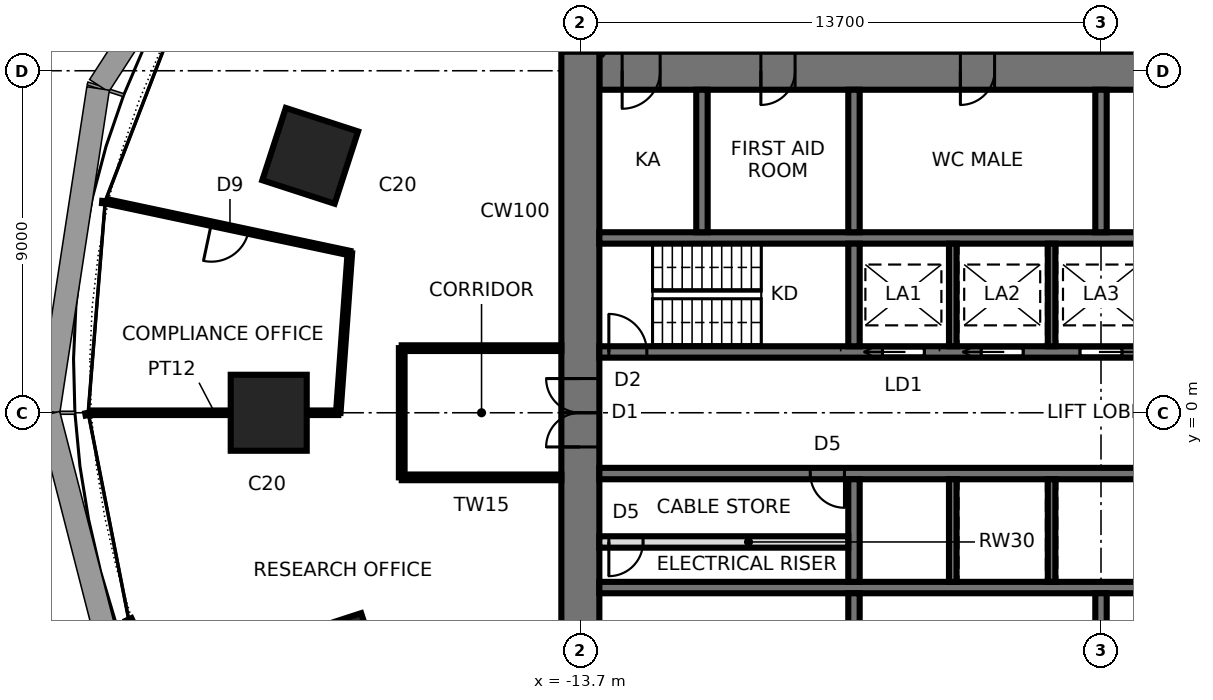
"""IFC4 building model, lengths in metres.
Left out: names, types, materials, properties, quantities, classifications, styles, units other than length and angle.
Written with IfcOpenShell. Run it as: python <this file> out.ifc"""

import sys

from ifc_helpers import new_model, si_unit, direction, frame, frame_2d, origin, origin_2d, place, context, subcontext, project, spatial, rectangle, extrude, element, fill, save


model = new_model("IFC4")
c1 = context("Model", 3, precision=1e-05, world=origin(), true_north=direction((0.0, 1.0)))
c2 = subcontext(c1, "Body", "Model", "MODEL_VIEW")
j1 = project(units=[si_unit("LENGTHUNIT", "METRE"), si_unit("PLANEANGLEUNIT", "RADIAN")], contexts=[c1])
p1 = place(None, origin())
s1 = spatial("IfcSite", under=j1, at=p1, CompositionType="ELEMENT")
p2 = place(p1, origin())
s2 = spatial("IfcBuilding", under=s1, at=p2, CompositionType="ELEMENT")
p3 = place(p2, frame((0.0, 0.0, 57.4)))
s3 = spatial("IfcBuildingStorey", under=s2, at=p3, CompositionType="ELEMENT", Elevation=57.4)
for number, where, z_axis, x_axis in (
    (1, (-20.808, 6.761, 0.0), (0.0, 0.0, 1.0), (-0.951, 0.309, 0.0)),
    (2, (-21.9, 0.0, 0.0), (0.0, 0.0, 1.0), (-1.0, 0.0, 0.0)),
    (3, (-20.109, -6.534, 0.0), (0.0, 0.0, 1.0), (-0.951, -0.309, 0.0)),
):
    element("IfcColumn", number, at=place(p3, frame(where, z_axis=z_axis, x_axis=x_axis)), inside=s3, PredefinedType="COLUMN", context=c2, shape_type="SweptSolid", body=[
        extrude(rectangle(XDim=2.0, YDim=2.0, at=origin_2d()), origin(), (0.0, 0.0, 1.0), 4.2),
    ])
p4 = place(p3, frame((13.2, 9.0, 0.0), z_axis=(0.0, 0.0, 1.0), x_axis=(-1.0, 0.0, 0.0)))
e4 = element("IfcWall", 4, at=p4, inside=s3, PredefinedType="SHEAR", context=c2, shape_type="SweptSolid", body=[
    extrude(rectangle(XDim=26.4, YDim=1.0, at=frame_2d((13.2, 0.0))), origin(), (0.0, 0.0, 1.0), 4.2),
])
p5 = place(p4, frame((2.65, 0.0, 0.0)))
e5 = element("IfcOpeningElement", 5, at=p5, cuts=e4, PredefinedType="OPENING", context=c2, shape_type="SweptSolid", body=[
    extrude(rectangle(XDim=0.9, YDim=2.1, at=frame_2d((0.45, 1.05))), frame((0.0, 0.51, 0.0), z_axis=(0.0, -1.0, 0.0), x_axis=(1.0, 0.0, 0.0)), (0.0, 0.0, 1.0), 1.02),
])
p6 = place(p4, frame((9.5, 0.0, 0.0)))
e6 = element("IfcOpeningElement", 6, at=p6, cuts=e4, PredefinedType="OPENING", context=c2, shape_type="SweptSolid", body=[
    extrude(rectangle(XDim=0.9, YDim=2.1, at=frame_2d((0.45, 1.05))), frame((0.0, 0.51, 0.0), z_axis=(0.0, -1.0, 0.0), x_axis=(1.0, 0.0, 0.0)), (0.0, 0.0, 1.0), 1.02),
])
p7 = place(p4, frame((16.0, 0.0, 0.0)))
e7 = element("IfcOpeningElement", 7, at=p7, cuts=e4, PredefinedType="OPENING", context=c2, shape_type="SweptSolid", body=[
    extrude(rectangle(XDim=0.9, YDim=2.1, at=frame_2d((0.45, 1.05))), frame((0.0, 0.51, 0.0), z_axis=(0.0, -1.0, 0.0), x_axis=(1.0, 0.0, 0.0)), (0.0, 0.0, 1.0), 1.02),
])
p8 = place(p4, frame((21.25, 0.0, 0.0)))
e8 = element("IfcOpeningElement", 8, at=p8, cuts=e4, PredefinedType="OPENING", context=c2, shape_type="SweptSolid", body=[
    extrude(rectangle(XDim=0.9, YDim=2.1, at=frame_2d((0.45, 1.05))), frame((0.0, 0.51, 0.0), z_axis=(0.0, -1.0, 0.0), x_axis=(1.0, 0.0, 0.0)), (0.0, 0.0, 1.0), 1.02),
])
p9 = place(p4, frame((24.8, 0.0, 0.0)))
e9 = element("IfcOpeningElement", 9, at=p9, cuts=e4, PredefinedType="OPENING", context=c2, shape_type="SweptSolid", body=[
    extrude(rectangle(XDim=1.0, YDim=2.1, at=frame_2d((0.5, 1.05))), frame((0.0, 0.51, 0.0), z_axis=(0.0, -1.0, 0.0), x_axis=(1.0, 0.0, 0.0)), (0.0, 0.0, 1.0), 1.02),
])
p10 = place(p3, frame((-13.7, 9.5, 0.0), z_axis=(0.0, 0.0, 1.0), x_axis=(0.0, -1.0, 0.0)))
e10 = element("IfcWall", 10, at=p10, inside=s3, PredefinedType="SHEAR", context=c2, shape_type="SweptSolid", body=[
    extrude(rectangle(XDim=19.0, YDim=1.0, at=frame_2d((9.5, 0.0))), origin(), (0.0, 0.0, 1.0), 4.2),
])
p11 = place(p10, frame((8.6, 0.0, 0.0)))
e11 = element("IfcOpeningElement", 11, at=p11, cuts=e10, PredefinedType="OPENING", context=c2, shape_type="SweptSolid", body=[
    extrude(rectangle(XDim=1.8, YDim=2.4, at=frame_2d((0.9, 1.2))), frame((0.0, 0.51, 0.0), z_axis=(0.0, -1.0, 0.0), x_axis=(1.0, 0.0, 0.0)), (0.0, 0.0, 1.0), 1.02),
])
p12 = place(p3, frame((-13.2, 1.6, 0.0), z_axis=(0.0, 0.0, 1.0), x_axis=(1.0, 0.0, 0.0)))
e12 = element("IfcWall", 12, at=p12, inside=s3, PredefinedType="SHEAR", context=c2, shape_type="SweptSolid", body=[
    extrude(rectangle(XDim=26.4, YDim=0.3, at=frame_2d((13.2, 0.0))), origin(), (0.0, 0.0, 1.0), 4.2),
])
p13 = place(p12, frame((0.25, 0.0, 0.0)))
e13 = element("IfcOpeningElement", 13, at=p13, cuts=e12, PredefinedType="OPENING", context=c2, shape_type="SweptSolid", body=[
    extrude(rectangle(XDim=1.0, YDim=2.1, at=frame_2d((0.5, 1.05))), frame((0.0, 0.16, 0.0), z_axis=(0.0, -1.0, 0.0), x_axis=(1.0, 0.0, 0.0)), (0.0, 0.0, 1.0), 0.32),
])
p14 = place(p12, frame((20.25, 0.0, 0.0)))
e14 = element("IfcOpeningElement", 14, at=p14, cuts=e12, PredefinedType="OPENING", context=c2, shape_type="SweptSolid", body=[
    extrude(rectangle(XDim=1.5, YDim=2.4, at=frame_2d((0.75, 1.2))), frame((0.0, 0.16, 0.0), z_axis=(0.0, -1.0, 0.0), x_axis=(1.0, 0.0, 0.0)), (0.0, 0.0, 1.0), 0.32),
])
p15 = place(p12, frame((7.45, 0.0, 0.0)))
e15 = element("IfcOpeningElement", 15, at=p15, cuts=e12, PredefinedType="OPENING", context=c2, shape_type="SweptSolid", body=[
    extrude(rectangle(XDim=1.1, YDim=2.3, at=frame_2d((0.55, 1.15))), frame((0.0, 0.16, 0.0), z_axis=(0.0, -1.0, 0.0), x_axis=(1.0, 0.0, 0.0)), (0.0, 0.0, 1.0), 0.32),
])
p16 = place(p12, frame((10.05, 0.0, 0.0)))
e16 = element("IfcOpeningElement", 16, at=p16, cuts=e12, PredefinedType="OPENING", context=c2, shape_type="SweptSolid", body=[
    extrude(rectangle(XDim=1.1, YDim=2.3, at=frame_2d((0.55, 1.15))), frame((0.0, 0.16, 0.0), z_axis=(0.0, -1.0, 0.0), x_axis=(1.0, 0.0, 0.0)), (0.0, 0.0, 1.0), 0.32),
])
p17 = place(p12, frame((12.65, 0.0, 0.0)))
e17 = element("IfcOpeningElement", 17, at=p17, cuts=e12, PredefinedType="OPENING", context=c2, shape_type="SweptSolid", body=[
    extrude(rectangle(XDim=1.1, YDim=2.3, at=frame_2d((0.55, 1.15))), frame((0.0, 0.16, 0.0), z_axis=(0.0, -1.0, 0.0), x_axis=(1.0, 0.0, 0.0)), (0.0, 0.0, 1.0), 0.32),
])
p18 = place(p12, frame((24.15, 0.0, 0.0)))
e18 = element("IfcOpeningElement", 18, at=p18, cuts=e12, PredefinedType="OPENING", context=c2, shape_type="SweptSolid", body=[
    extrude(rectangle(XDim=0.9, YDim=2.1, at=frame_2d((0.45, 1.05))), frame((0.0, 0.16, 0.0), z_axis=(0.0, -1.0, 0.0), x_axis=(1.0, 0.0, 0.0)), (0.0, 0.0, 1.0), 0.32),
])
p19 = place(p3, frame((-13.2, -1.6, 0.0), z_axis=(0.0, 0.0, 1.0), x_axis=(1.0, 0.0, 0.0)))
e19 = element("IfcWall", 19, at=p19, inside=s3, PredefinedType="SHEAR", context=c2, shape_type="SweptSolid", body=[
    extrude(rectangle(XDim=26.4, YDim=0.3, at=frame_2d((13.2, 0.0))), origin(), (0.0, 0.0, 1.0), 4.2),
])
p20 = place(p19, frame((25.15, 0.0, 0.0)))
e20 = element("IfcOpeningElement", 20, at=p20, cuts=e19, PredefinedType="OPENING", context=c2, shape_type="SweptSolid", body=[
    extrude(rectangle(XDim=1.0, YDim=2.1, at=frame_2d((0.5, 1.05))), frame((0.0, 0.16, 0.0), z_axis=(0.0, -1.0, 0.0), x_axis=(1.0, 0.0, 0.0)), (0.0, 0.0, 1.0), 0.32),
])
p21 = place(p19, frame((15.25, 0.0, 0.0)))
e21 = element("IfcOpeningElement", 21, at=p21, cuts=e19, PredefinedType="OPENING", context=c2, shape_type="SweptSolid", body=[
    extrude(rectangle(XDim=1.1, YDim=2.3, at=frame_2d((0.55, 1.15))), frame((0.0, 0.16, 0.0), z_axis=(0.0, -1.0, 0.0), x_axis=(1.0, 0.0, 0.0)), (0.0, 0.0, 1.0), 0.32),
])
p22 = place(p19, frame((17.85, 0.0, 0.0)))
e22 = element("IfcOpeningElement", 22, at=p22, cuts=e19, PredefinedType="OPENING", context=c2, shape_type="SweptSolid", body=[
    extrude(rectangle(XDim=1.1, YDim=2.3, at=frame_2d((0.55, 1.15))), frame((0.0, 0.16, 0.0), z_axis=(0.0, -1.0, 0.0), x_axis=(1.0, 0.0, 0.0)), (0.0, 0.0, 1.0), 0.32),
])
p23 = place(p19, frame((5.55, 0.0, 0.0)))
e23 = element("IfcOpeningElement", 23, at=p23, cuts=e19, PredefinedType="OPENING", context=c2, shape_type="SweptSolid", body=[
    extrude(rectangle(XDim=0.9, YDim=2.1, at=frame_2d((0.45, 1.05))), frame((0.0, 0.16, 0.0), z_axis=(0.0, -1.0, 0.0), x_axis=(1.0, 0.0, 0.0)), (0.0, 0.0, 1.0), 0.32),
])
for number, where, z_axis, x_axis in (
    (24, (-13.2, 4.6, 0.0), (0.0, 0.0, 1.0), (1.0, 0.0, 0.0)),
    (25, (-13.2, -4.6, 0.0), (0.0, 0.0, 1.0), (1.0, 0.0, 0.0)),
):
    element("IfcWall", number, at=place(p3, frame(where, z_axis=z_axis, x_axis=x_axis)), inside=s3, PredefinedType="SHEAR", context=c2, shape_type="SweptSolid", body=[
        extrude(rectangle(XDim=26.4, YDim=0.3, at=frame_2d((13.2, 0.0))), origin(), (0.0, 0.0, 1.0), 4.2),
    ])
p24 = place(p3, frame((-6.5, 1.75, 0.0), z_axis=(0.0, 0.0, 1.0), x_axis=(0.0, 1.0, 0.0)))
e26 = element("IfcWall", 26, at=p24, inside=s3, PredefinedType="SHEAR", context=c2, shape_type="SweptSolid", body=[
    extrude(rectangle(XDim=2.7, YDim=0.3, at=frame_2d((1.35, 0.0))), origin(), (0.0, 0.0, 1.0), 4.2),
])
p25 = place(p3, frame((-6.5, 4.75, 0.0), z_axis=(0.0, 0.0, 1.0), x_axis=(0.0, 1.0, 0.0)))
e27 = element("IfcWall", 27, at=p25, inside=s3, PredefinedType="SHEAR", context=c2, shape_type="SweptSolid", body=[
    extrude(rectangle(XDim=3.75, YDim=0.3, at=frame_2d((1.875, 0.0))), origin(), (0.0, 0.0, 1.0), 4.2),
])
for number, where, z_axis, x_axis in (
    (28, (-3.9, 1.75, 0.0), (0.0, 0.0, 1.0), (0.0, 1.0, 0.0)),
    (29, (-1.3, 1.75, 0.0), (0.0, 0.0, 1.0), (0.0, 1.0, 0.0)),
):
    element("IfcWall", number, at=place(p3, frame(where, z_axis=z_axis, x_axis=x_axis)), inside=s3, PredefinedType="SHEAR", context=c2, shape_type="SweptSolid", body=[
        extrude(rectangle(XDim=2.7, YDim=0.2, at=frame_2d((1.35, 0.0))), origin(), (0.0, 0.0, 1.0), 4.2),
    ])
p26 = place(p3, frame((0.0, 4.75, 0.0), z_axis=(0.0, 0.0, 1.0), x_axis=(0.0, 1.0, 0.0)))
e30 = element("IfcWall", 30, at=p26, inside=s3, PredefinedType="SHEAR", context=c2, shape_type="SweptSolid", body=[
    extrude(rectangle(XDim=3.75, YDim=0.3, at=frame_2d((1.875, 0.0))), origin(), (0.0, 0.0, 1.0), 4.2),
])
p27 = place(p3, frame((-6.5, -1.75, 0.0), z_axis=(0.0, 0.0, 1.0), x_axis=(0.0, -1.0, 0.0)))
e31 = element("IfcWall", 31, at=p27, inside=s3, PredefinedType="SHEAR", context=c2, shape_type="SweptSolid", body=[
    extrude(rectangle(XDim=2.7, YDim=0.3, at=frame_2d((1.35, 0.0))), origin(), (0.0, 0.0, 1.0), 4.2),
])
p28 = place(p3, frame((-6.5, -4.75, 0.0), z_axis=(0.0, 0.0, 1.0), x_axis=(0.0, -1.0, 0.0)))
e32 = element("IfcWall", 32, at=p28, inside=s3, PredefinedType="SHEAR", context=c2, shape_type="SweptSolid", body=[
    extrude(rectangle(XDim=3.75, YDim=0.3, at=frame_2d((1.875, 0.0))), origin(), (0.0, 0.0, 1.0), 4.2),
])
for number, where, z_axis, x_axis in (
    (33, (-3.9, -1.75, 0.0), (0.0, 0.0, 1.0), (0.0, -1.0, 0.0)),
    (34, (-1.3, -1.75, 0.0), (0.0, 0.0, 1.0), (0.0, -1.0, 0.0)),
):
    element("IfcWall", number, at=place(p3, frame(where, z_axis=z_axis, x_axis=x_axis)), inside=s3, PredefinedType="SHEAR", context=c2, shape_type="SweptSolid", body=[
        extrude(rectangle(XDim=2.7, YDim=0.2, at=frame_2d((1.35, 0.0))), origin(), (0.0, 0.0, 1.0), 4.2),
    ])
for number, where, z_axis, x_axis in (
    (35, (0.0, -4.75, 0.0), (0.0, 0.0, 1.0), (0.0, -1.0, 0.0)),
    (36, (-10.5, 4.75, 0.0), (0.0, 0.0, 1.0), (0.0, 1.0, 0.0)),
):
    element("IfcWall", number, at=place(p3, frame(where, z_axis=z_axis, x_axis=x_axis)), inside=s3, PredefinedType="SHEAR", context=c2, shape_type="SweptSolid", body=[
        extrude(rectangle(XDim=3.75, YDim=0.3, at=frame_2d((1.875, 0.0))), origin(), (0.0, 0.0, 1.0), 4.2),
    ])
p29 = place(p3, frame((-13.2, -3.4, 0.0), z_axis=(0.0, 0.0, 1.0), x_axis=(1.0, 0.0, 0.0)))
e37 = element("IfcWall", 37, at=p29, inside=s3, PredefinedType="SOLIDWALL", context=c2, shape_type="SweptSolid", body=[
    extrude(rectangle(XDim=6.55, YDim=0.3, at=frame_2d((3.275, 0.0))), origin(), (0.0, 0.0, 1.0), 4.04),
])
p30 = place(p29, frame((0.25, 0.0, 0.0)))
e38 = element("IfcOpeningElement", 38, at=p30, cuts=e37, PredefinedType="OPENING", context=c2, shape_type="SweptSolid", body=[
    extrude(rectangle(XDim=0.9, YDim=2.1, at=frame_2d((0.45, 1.05))), frame((0.0, 0.16, 0.0), z_axis=(0.0, -1.0, 0.0), x_axis=(1.0, 0.0, 0.0)), (0.0, 0.0, 1.0), 0.32),
])
p31 = place(p3, frame((-18.4, -1.7, 0.0), z_axis=(0.0, 0.0, 1.0), x_axis=(1.0, 0.0, 0.0)))
e39 = element("IfcWall", 39, at=p31, inside=s3, PredefinedType="PARTITIONING", context=c2, shape_type="SweptSolid", body=[
    extrude(rectangle(XDim=4.2, YDim=0.15, at=frame_2d((2.1, 0.0))), origin(), (0.0, 0.0, 1.0), 4.04),
])
p32 = place(p3, frame((-13.076, 9.5, 0.0), z_axis=(0.0, 0.0, 1.0), x_axis=(-0.809017564037, 0.587784468219, 0.0)))
e40 = element("IfcWall", 40, at=p32, inside=s3, PredefinedType="PARTITIONING", context=c2, shape_type="SweptSolid", body=[
    extrude(rectangle(XDim=9.561, YDim=0.12, at=frame_2d((4.781, 0.0))), origin(), (0.0, 0.0, 1.0), 2.84),
])
p33 = place(p32, frame((2.803, 0.0, 0.0)))
e41 = element("IfcOpeningElement", 41, at=p33, cuts=e40, PredefinedType="OPENING", context=c2, shape_type="SweptSolid", body=[
    extrude(rectangle(XDim=1.0, YDim=2.4, at=frame_2d((0.5, 1.2))), frame((0.0, 0.07, 0.0), z_axis=(0.0, -1.0, 0.0), x_axis=(1.0, 0.0, 0.0)), (0.0, 0.0, 1.0), 0.14),
])
p34 = place(p3, frame((-19.765, 4.201, 0.0), z_axis=(0.0, 0.0, 1.0), x_axis=(-0.978143001923, 0.207933325345, 0.0)))
e42 = element("IfcWall", 42, at=p34, inside=s3, PredefinedType="PARTITIONING", context=c2, shape_type="SweptSolid", body=[
    extrude(rectangle(XDim=6.5, YDim=0.12, at=frame_2d((3.25, 0.0))), origin(), (0.0, 0.0, 1.0), 4.04),
])
p35 = place(p34, frame((2.725, 0.0, 0.0)))
e43 = element("IfcOpeningElement", 43, at=p35, cuts=e42, PredefinedType="OPENING", context=c2, shape_type="SweptSolid", body=[
    extrude(rectangle(XDim=1.0, YDim=2.4, at=frame_2d((0.5, 1.2))), frame((0.0, 0.07, 0.0), z_axis=(0.0, -1.0, 0.0), x_axis=(1.0, 0.0, 0.0)), (0.0, 0.0, 1.0), 0.14),
])
p36 = place(p3, frame((-20.07, 0.0, 0.0), z_axis=(0.0, 0.0, 1.0), x_axis=(0.072334424812, 0.997380434432, 0.0)))
e44 = element("IfcWall", 44, at=p36, inside=s3, PredefinedType="PARTITIONING", context=c2, shape_type="SweptSolid", body=[
    extrude(rectangle(XDim=4.212, YDim=0.12, at=frame_2d((2.106, 0.0))), origin(), (0.0, 0.0, 1.0), 4.04),
])
p37 = place(p3, frame((-14.2, 1.7, 0.0), z_axis=(0.0, 0.0, 1.0), x_axis=(-1.0, 0.0, 0.0)))
e45 = element("IfcWall", 45, at=p37, inside=s3, PredefinedType="PARTITIONING", context=c2, shape_type="SweptSolid", body=[
    extrude(rectangle(XDim=4.2, YDim=0.15, at=frame_2d((2.1, 0.0))), origin(), (0.0, 0.0, 1.0), 4.04),
])
p38 = place(p3, frame((-26.57, 0.0, 0.0), z_axis=(0.0, 0.0, 1.0), x_axis=(1.0, 0.0, 0.0)))
e46 = element("IfcWall", 46, at=p38, inside=s3, PredefinedType="PARTITIONING", context=c2, shape_type="SweptSolid", body=[
    extrude(rectangle(XDim=6.5, YDim=0.12, at=frame_2d((3.25, 0.0))), origin(), (0.0, 0.0, 1.0), 2.84),
])
p39 = place(p3, frame((-18.4, 1.7, 0.0), z_axis=(0.0, 0.0, 1.0), x_axis=(0.0, -1.0, 0.0)))
e47 = element("IfcWall", 47, at=p39, inside=s3, PredefinedType="PARTITIONING", context=c2, shape_type="SweptSolid", body=[
    extrude(rectangle(XDim=3.4, YDim=0.15, at=frame_2d((1.7, 0.0))), origin(), (0.0, 0.0, 1.0), 4.04),
])
p40 = place(p11, frame((1.8, 0.0, 0.0), z_axis=(0.0, 0.0, 1.0), x_axis=(-1.0, 0.0, 0.0)))
e48 = element("IfcDoor", 48, at=p40, inside=s3, OperationType="DOUBLE_DOOR_SINGLE_SWING", PredefinedType="DOOR", context=c2, shape_type="SweptSolid", body=[
    extrude(rectangle(XDim=1.72, YDim=2.36, at=frame_2d((0.9, 1.18))), frame((0.0, 0.025, 0.0), z_axis=(0.0, -1.0, 0.0), x_axis=(1.0, 0.0, 0.0)), (0.0, 0.0, 1.0), 0.05),
    extrude(rectangle(XDim=0.04, YDim=2.4, at=frame_2d((1.78, 1.2))), frame((0.0, 0.25, 0.0), z_axis=(0.0, -1.0, 0.0), x_axis=(1.0, 0.0, 0.0)), (0.0, 0.0, 1.0), 0.5),
    extrude(rectangle(XDim=0.04, YDim=2.4, at=frame_2d((0.02, 1.2))), frame((0.0, 0.25, 0.0), z_axis=(0.0, -1.0, 0.0), x_axis=(1.0, 0.0, 0.0)), (0.0, 0.0, 1.0), 0.5),
    extrude(rectangle(XDim=1.72, YDim=0.04, at=frame_2d((0.9, 2.38))), frame((0.0, 0.25, 0.0), z_axis=(0.0, -1.0, 0.0), x_axis=(1.0, 0.0, 0.0)), (0.0, 0.0, 1.0), 0.5),
])
fill(e11, e48)
p41 = place(p13, origin())
e49 = element("IfcDoor", 49, at=p41, inside=s3, OperationType="SINGLE_SWING_LEFT", PredefinedType="DOOR", context=c2, shape_type="SweptSolid", body=[
    extrude(rectangle(XDim=1.0, YDim=2.1, at=frame_2d((0.5, 1.05))), frame((0.0, 0.025, 0.0), z_axis=(0.0, -1.0, 0.0), x_axis=(1.0, 0.0, 0.0)), (0.0, 0.0, 1.0), 0.05),
])
fill(e13, e49)
p42 = place(p15, origin())
e50 = element("IfcDoor", 50, at=p42, inside=s3, OperationType="SLIDING_TO_LEFT", PredefinedType="DOOR", context=c2, shape_type="SweptSolid", body=[
    extrude(rectangle(XDim=1.1, YDim=2.3, at=frame_2d((0.55, 1.15))), frame((0.0, 0.025, 0.0), z_axis=(0.0, -1.0, 0.0), x_axis=(1.0, 0.0, 0.0)), (0.0, 0.0, 1.0), 0.05),
])
fill(e15, e50)
p43 = place(p16, origin())
e51 = element("IfcDoor", 51, at=p43, inside=s3, OperationType="SLIDING_TO_LEFT", PredefinedType="DOOR", context=c2, shape_type="SweptSolid", body=[
    extrude(rectangle(XDim=1.1, YDim=2.3, at=frame_2d((0.55, 1.15))), frame((0.0, 0.025, 0.0), z_axis=(0.0, -1.0, 0.0), x_axis=(1.0, 0.0, 0.0)), (0.0, 0.0, 1.0), 0.05),
])
fill(e16, e51)
p44 = place(p17, origin())
e52 = element("IfcDoor", 52, at=p44, inside=s3, OperationType="SLIDING_TO_RIGHT", PredefinedType="DOOR", context=c2, shape_type="SweptSolid", body=[
    extrude(rectangle(XDim=1.1, YDim=2.3, at=frame_2d((0.55, 1.15))), frame((0.0, 0.025, 0.0), z_axis=(0.0, -1.0, 0.0), x_axis=(1.0, 0.0, 0.0)), (0.0, 0.0, 1.0), 0.05),
])
fill(e17, e52)
p45 = place(p23, frame((0.9, 0.0, 0.0), z_axis=(0.0, 0.0, 1.0), x_axis=(-1.0, 0.0, 0.0)))
e53 = element("IfcDoor", 53, at=p45, inside=s3, OperationType="SINGLE_SWING_LEFT", PredefinedType="DOOR", context=c2, shape_type="SweptSolid", body=[
    extrude(rectangle(XDim=0.9, YDim=2.1, at=frame_2d((0.45, 1.05))), frame((0.0, 0.025, 0.0), z_axis=(0.0, -1.0, 0.0), x_axis=(1.0, 0.0, 0.0)), (0.0, 0.0, 1.0), 0.05),
])
fill(e23, e53)
p46 = place(p7, origin())
e54 = element("IfcDoor", 54, at=p46, inside=s3, OperationType="SINGLE_SWING_RIGHT", PredefinedType="DOOR", context=c2, shape_type="SweptSolid", body=[
    extrude(rectangle(XDim=0.82, YDim=2.06, at=frame_2d((0.45, 1.03))), frame((0.0, 0.025, 0.0), z_axis=(0.0, -1.0, 0.0), x_axis=(1.0, 0.0, 0.0)), (0.0, 0.0, 1.0), 0.05),
    extrude(rectangle(XDim=0.04, YDim=2.1, at=frame_2d((0.02, 1.05))), frame((0.0, 0.25, 0.0), z_axis=(0.0, -1.0, 0.0), x_axis=(1.0, 0.0, 0.0)), (0.0, 0.0, 1.0), 0.5),
    extrude(rectangle(XDim=0.04, YDim=2.1, at=frame_2d((0.88, 1.05))), frame((0.0, 0.25, 0.0), z_axis=(0.0, -1.0, 0.0), x_axis=(1.0, 0.0, 0.0)), (0.0, 0.0, 1.0), 0.5),
    extrude(rectangle(XDim=0.82, YDim=0.04, at=frame_2d((0.45, 2.08))), frame((0.0, 0.25, 0.0), z_axis=(0.0, -1.0, 0.0), x_axis=(1.0, 0.0, 0.0)), (0.0, 0.0, 1.0), 0.5),
])
fill(e7, e54)
p47 = place(p8, origin())
e55 = element("IfcDoor", 55, at=p47, inside=s3, OperationType="SINGLE_SWING_RIGHT", PredefinedType="DOOR", context=c2, shape_type="SweptSolid", body=[
    extrude(rectangle(XDim=0.82, YDim=2.06, at=frame_2d((0.45, 1.03))), frame((0.0, 0.025, 0.0), z_axis=(0.0, -1.0, 0.0), x_axis=(1.0, 0.0, 0.0)), (0.0, 0.0, 1.0), 0.05),
    extrude(rectangle(XDim=0.04, YDim=2.1, at=frame_2d((0.02, 1.05))), frame((0.0, 0.25, 0.0), z_axis=(0.0, -1.0, 0.0), x_axis=(1.0, 0.0, 0.0)), (0.0, 0.0, 1.0), 0.5),
    extrude(rectangle(XDim=0.04, YDim=2.1, at=frame_2d((0.88, 1.05))), frame((0.0, 0.25, 0.0), z_axis=(0.0, -1.0, 0.0), x_axis=(1.0, 0.0, 0.0)), (0.0, 0.0, 1.0), 0.5),
    extrude(rectangle(XDim=0.82, YDim=0.04, at=frame_2d((0.45, 2.08))), frame((0.0, 0.25, 0.0), z_axis=(0.0, -1.0, 0.0), x_axis=(1.0, 0.0, 0.0)), (0.0, 0.0, 1.0), 0.5),
])
fill(e8, e55)
p48 = place(p9, origin())
e56 = element("IfcDoor", 56, at=p48, inside=s3, OperationType="SINGLE_SWING_RIGHT", PredefinedType="DOOR", context=c2, shape_type="SweptSolid", body=[
    extrude(rectangle(XDim=0.92, YDim=2.06, at=frame_2d((0.5, 1.03))), frame((0.0, 0.025, 0.0), z_axis=(0.0, -1.0, 0.0), x_axis=(1.0, 0.0, 0.0)), (0.0, 0.0, 1.0), 0.05),
    extrude(rectangle(XDim=0.04, YDim=2.1, at=frame_2d((0.02, 1.05))), frame((0.0, 0.25, 0.0), z_axis=(0.0, -1.0, 0.0), x_axis=(1.0, 0.0, 0.0)), (0.0, 0.0, 1.0), 0.5),
    extrude(rectangle(XDim=0.04, YDim=2.1, at=frame_2d((0.98, 1.05))), frame((0.0, 0.25, 0.0), z_axis=(0.0, -1.0, 0.0), x_axis=(1.0, 0.0, 0.0)), (0.0, 0.0, 1.0), 0.5),
    extrude(rectangle(XDim=0.92, YDim=0.04, at=frame_2d((0.5, 2.08))), frame((0.0, 0.25, 0.0), z_axis=(0.0, -1.0, 0.0), x_axis=(1.0, 0.0, 0.0)), (0.0, 0.0, 1.0), 0.5),
])
fill(e9, e56)
p49 = place(p30, frame((0.9, 0.0, 0.0), z_axis=(0.0, 0.0, 1.0), x_axis=(-1.0, 0.0, 0.0)))
e57 = element("IfcDoor", 57, at=p49, inside=s3, OperationType="SINGLE_SWING_RIGHT", PredefinedType="DOOR", context=c2, shape_type="SweptSolid", body=[
    extrude(rectangle(XDim=0.9, YDim=2.1, at=frame_2d((0.45, 1.05))), frame((0.0, 0.025, 0.0), z_axis=(0.0, -1.0, 0.0), x_axis=(1.0, 0.0, 0.0)), (0.0, 0.0, 1.0), 0.05),
])
fill(e38, e57)
p50 = place(p35, origin())
e58 = element("IfcDoor", 58, at=p50, inside=s3, OperationType="SINGLE_SWING_RIGHT", PredefinedType="DOOR", context=c2, shape_type="SweptSolid", body=[
    extrude(rectangle(XDim=1.0, YDim=2.4, at=frame_2d((0.5, 1.2))), frame((0.0, 0.025, 0.0), z_axis=(0.0, -1.0, 0.0), x_axis=(1.0, 0.0, 0.0)), (0.0, 0.0, 1.0), 0.05),
])
fill(e43, e58)
save(model, sys.argv[1])
